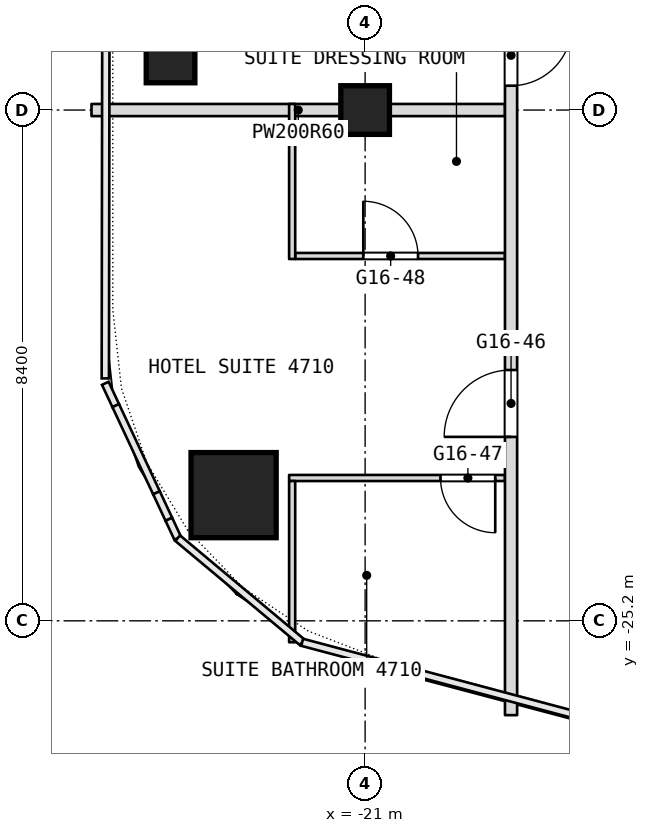
"""IFC4 building model, lengths in metres.
Left out: names, types, materials, properties, quantities, classifications, styles, units other than length and angle.
Written with IfcOpenShell. Run it as: python <this file> out.ifc"""

import sys

from ifc_helpers import new_model, si_unit, direction, frame, frame_2d, origin, origin_2d, place, context, subcontext, project, spatial, rectangle, extrude, element, fill, save


model = new_model("IFC4")
c1 = context("Model", 3, precision=1e-05, world=origin(), true_north=direction((0.0, 1.0)))
c2 = subcontext(c1, "Body", "Model", "MODEL_VIEW")
j1 = project(units=[si_unit("LENGTHUNIT", "METRE"), si_unit("PLANEANGLEUNIT", "RADIAN")], contexts=[c1])
p1 = place(None, origin())
s1 = spatial("IfcSite", under=j1, at=p1, CompositionType="ELEMENT")
p2 = place(p1, origin())
s2 = spatial("IfcBuilding", under=s1, at=p2, CompositionType="ELEMENT")
p3 = place(p2, frame((0.0, 0.0, 205.7)))
s3 = spatial("IfcBuildingStorey", under=s2, at=p3, CompositionType="ELEMENT", Elevation=205.7)
p4 = place(p3, frame((-23.163, -23.133, 0.0), z_axis=(0.0, 0.0, 1.0), x_axis=(1.0, 0.0, 0.0)))
e1 = element("IfcColumn", 1, at=p4, inside=s3, PredefinedType="COLUMN", context=c2, shape_type="SweptSolid", body=[
    extrude(rectangle(XDim=1.4, YDim=1.4, at=origin_2d()), origin(), (0.0, 0.0, 1.0), 3.6),
])
for number, where, z_axis, x_axis in (
    (2, (-21.0, -16.8, 0.0), (0.0, 0.0, 1.0), (1.0, 0.0, 0.0)),
    (3, (-24.2, -15.952, 0.0), (0.0, 0.0, 1.0), (1.0, 0.0, 0.0)),
):
    element("IfcColumn", number, at=place(p3, frame(where, z_axis=z_axis, x_axis=x_axis)), inside=s3, PredefinedType="COLUMN", context=c2, shape_type="SweptSolid", body=[
        extrude(rectangle(XDim=0.8, YDim=0.8, at=origin_2d()), origin(), (0.0, 0.0, 1.0), 3.6),
    ])
p5 = place(p3, frame((-22.25, -22.851, 0.0), z_axis=(0.0, 0.0, 1.0), x_axis=(1.0, 0.0, 0.0)))
e4 = element("IfcWall", 4, at=p5, inside=s3, PredefinedType="PARTITIONING", context=c2, shape_type="SweptSolid", body=[
    extrude(rectangle(XDim=3.55, YDim=0.1, at=frame_2d((1.775, 0.0))), origin(), (0.0, 0.0, 1.0), 3.34),
])
p6 = place(p5, frame((2.49, 0.0, 0.0)))
e5 = element("IfcOpeningElement", 5, at=p6, cuts=e4, PredefinedType="OPENING", context=c2, shape_type="SweptSolid", body=[
    extrude(rectangle(XDim=0.9, YDim=2.1, at=frame_2d((0.45, 1.05))), frame((0.0, 0.05, 0.0), z_axis=(0.0, -1.0, 0.0), x_axis=(1.0, 0.0, 0.0)), (0.0, 0.0, 1.0), 0.1),
])
p7 = place(p3, frame((-22.15, -19.2, 0.0), z_axis=(0.0, 0.0, 1.0), x_axis=(1.0, 0.0, 0.0)))
e6 = element("IfcWall", 6, at=p7, inside=s3, PredefinedType="PARTITIONING", context=c2, shape_type="SweptSolid", body=[
    extrude(rectangle(XDim=3.45, YDim=0.1, at=frame_2d((1.725, 0.0))), origin(), (0.0, 0.0, 1.0), 3.34),
])
p8 = place(p7, frame((1.12, 0.0, 0.0)))
e7 = element("IfcOpeningElement", 7, at=p8, cuts=e6, PredefinedType="OPENING", context=c2, shape_type="SweptSolid", body=[
    extrude(rectangle(XDim=0.9, YDim=2.1, at=frame_2d((0.45, 1.05))), frame((0.0, 0.05, 0.0), z_axis=(0.0, -1.0, 0.0), x_axis=(1.0, 0.0, 0.0)), (0.0, 0.0, 1.0), 0.1),
])
p9 = place(p3, frame((-25.5, -16.8, 0.0), z_axis=(0.0, 0.0, 1.0), x_axis=(1.0, 0.0, 0.0)))
e8 = element("IfcWall", 8, at=p9, inside=s3, PredefinedType="PARTITIONING", context=c2, shape_type="SweptSolid", body=[
    extrude(rectangle(XDim=6.8, YDim=0.2, at=frame_2d((3.4, 0.0))), origin(), (0.0, 0.0, 1.0), 2.94),
])
p10 = place(p3, frame((-18.6, -26.751, 0.0), z_axis=(0.0, 0.0, 1.0), x_axis=(0.0, 1.0, 0.0)))
e9 = element("IfcWall", 9, at=p10, inside=s3, PredefinedType="PARTITIONING", context=c2, shape_type="SweptSolid", body=[
    extrude(rectangle(XDim=49.091, YDim=0.2, at=frame_2d((24.545, 0.0))), origin(), (0.0, 0.0, 1.0), 3.34),
])
p11 = place(p10, frame((4.576, 0.0, 0.0)))
e10 = element("IfcOpeningElement", 10, at=p11, cuts=e9, PredefinedType="OPENING", context=c2, shape_type="SweptSolid", body=[
    extrude(rectangle(XDim=1.1, YDim=2.1, at=frame_2d((0.55, 1.05))), frame((0.0, 0.1, 0.0), z_axis=(0.0, -1.0, 0.0), x_axis=(1.0, 0.0, 0.0)), (0.0, 0.0, 1.0), 0.2),
])
p12 = place(p10, frame((10.351, 0.0, 0.0)))
e11 = element("IfcOpeningElement", 11, at=p12, cuts=e9, PredefinedType="OPENING", context=c2, shape_type="SweptSolid", body=[
    extrude(rectangle(XDim=1.0, YDim=2.1, at=frame_2d((0.5, 1.05))), frame((0.0, 0.1, 0.0), z_axis=(0.0, -1.0, 0.0), x_axis=(1.0, 0.0, 0.0)), (0.0, 0.0, 1.0), 0.2),
])
p13 = place(p10, frame((16.951, 0.0, 0.0)))
e12 = element("IfcOpeningElement", 12, at=p13, cuts=e9, PredefinedType="OPENING", context=c2, shape_type="SweptSolid", body=[
    extrude(rectangle(XDim=1.0, YDim=2.1, at=frame_2d((0.5, 1.05))), frame((0.0, 0.1, 0.0), z_axis=(0.0, -1.0, 0.0), x_axis=(1.0, 0.0, 0.0)), (0.0, 0.0, 1.0), 0.2),
])
p14 = place(p10, frame((22.051, 0.0, 0.0)))
e13 = element("IfcOpeningElement", 13, at=p14, cuts=e9, PredefinedType="OPENING", context=c2, shape_type="SweptSolid", body=[
    extrude(rectangle(XDim=1.1, YDim=2.1, at=frame_2d((0.55, 1.05))), frame((0.0, 0.1, 0.0), z_axis=(0.0, -1.0, 0.0), x_axis=(1.0, 0.0, 0.0)), (0.0, 0.0, 1.0), 0.2),
])
p15 = place(p10, frame((30.351, 0.0, 0.0)))
e14 = element("IfcOpeningElement", 14, at=p15, cuts=e9, PredefinedType="OPENING", context=c2, shape_type="SweptSolid", body=[
    extrude(rectangle(XDim=1.1, YDim=2.1, at=frame_2d((0.55, 1.05))), frame((0.0, 0.1, 0.0), z_axis=(0.0, -1.0, 0.0), x_axis=(1.0, 0.0, 0.0)), (0.0, 0.0, 1.0), 0.2),
])
p16 = place(p10, frame((40.901, 0.0, 0.0)))
e15 = element("IfcOpeningElement", 15, at=p16, cuts=e9, PredefinedType="OPENING", context=c2, shape_type="SweptSolid", body=[
    extrude(rectangle(XDim=1.1, YDim=2.1, at=frame_2d((0.55, 1.05))), frame((0.0, 0.1, 0.0), z_axis=(0.0, -1.0, 0.0), x_axis=(1.0, 0.0, 0.0)), (0.0, 0.0, 1.0), 0.2),
])
p17 = place(p10, frame((44.051, 0.0, 0.0)))
e16 = element("IfcOpeningElement", 16, at=p17, cuts=e9, PredefinedType="OPENING", context=c2, shape_type="SweptSolid", body=[
    extrude(rectangle(XDim=1.0, YDim=2.1, at=frame_2d((0.5, 1.05))), frame((0.0, 0.1, 0.0), z_axis=(0.0, -1.0, 0.0), x_axis=(1.0, 0.0, 0.0)), (0.0, 0.0, 1.0), 0.2),
])
p18 = place(p3, frame((-22.2, -25.552, 0.0), z_axis=(0.0, 0.0, 1.0), x_axis=(0.0, 1.0, 0.0)))
e17 = element("IfcWall", 17, at=p18, inside=s3, PredefinedType="PARTITIONING", context=c2, shape_type="SweptSolid", body=[
    extrude(rectangle(XDim=2.651, YDim=0.1, at=frame_2d((1.326, 0.0))), origin(), (0.0, 0.0, 1.0), 3.34),
])
p19 = place(p3, frame((-22.2, -19.25, 0.0), z_axis=(0.0, 0.0, 1.0), x_axis=(0.0, 1.0, 0.0)))
e18 = element("IfcWall", 18, at=p19, inside=s3, PredefinedType="PARTITIONING", context=c2, shape_type="SweptSolid", body=[
    extrude(rectangle(XDim=2.55, YDim=0.1, at=frame_2d((1.275, 0.0))), origin(), (0.0, 0.0, 1.0), 3.34),
])
p20 = place(p6, origin())
e19 = element("IfcDoor", 19, at=p20, inside=s3, OperationType="SINGLE_SWING_LEFT", PredefinedType="DOOR", context=c2, shape_type="SweptSolid", body=[
    extrude(rectangle(XDim=0.9, YDim=2.1, at=frame_2d((0.45, 1.05))), frame((0.0, 0.025, 0.0), z_axis=(0.0, -1.0, 0.0), x_axis=(1.0, 0.0, 0.0)), (0.0, 0.0, 1.0), 0.05),
])
fill(e5, e19)
p21 = place(p8, origin())
e20 = element("IfcDoor", 20, at=p21, inside=s3, OperationType="SINGLE_SWING_LEFT", PredefinedType="DOOR", context=c2, shape_type="SweptSolid", body=[
    extrude(rectangle(XDim=0.9, YDim=2.1, at=frame_2d((0.45, 1.05))), frame((0.0, 0.025, 0.0), z_axis=(0.0, -1.0, 0.0), x_axis=(1.0, 0.0, 0.0)), (0.0, 0.0, 1.0), 0.05),
])
fill(e7, e20)
p22 = place(p11, origin())
e21 = element("IfcDoor", 21, at=p22, inside=s3, OperationType="SINGLE_SWING_LEFT", PredefinedType="DOOR", context=c2, shape_type="SweptSolid", body=[
    extrude(rectangle(XDim=1.1, YDim=2.1, at=frame_2d((0.55, 1.05))), frame((0.0, 0.025, 0.0), z_axis=(0.0, -1.0, 0.0), x_axis=(1.0, 0.0, 0.0)), (0.0, 0.0, 1.0), 0.05),
])
fill(e10, e21)
p23 = place(p12, origin())
e22 = element("IfcDoor", 22, at=p23, inside=s3, OperationType="SINGLE_SWING_RIGHT", PredefinedType="DOOR", context=c2, shape_type="SweptSolid", body=[
    extrude(rectangle(XDim=1.0, YDim=2.1, at=frame_2d((0.5, 1.05))), frame((0.0, 0.025, 0.0), z_axis=(0.0, -1.0, 0.0), x_axis=(1.0, 0.0, 0.0)), (0.0, 0.0, 1.0), 0.05),
])
fill(e11, e22)
save(model, sys.argv[1])
